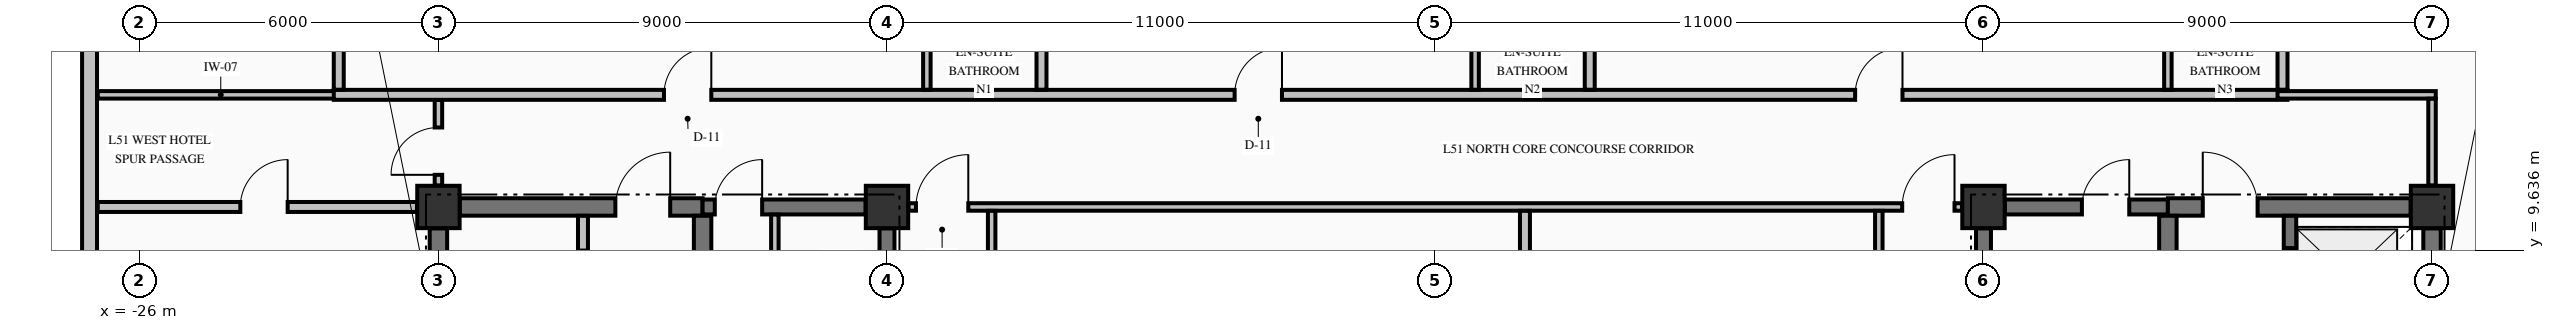
"""IFC4 building model, lengths in metres.
Left out: names, types, materials, properties, quantities, classifications, styles, units other than length and angle.
Written with IfcOpenShell. Run it as: python <this file> out.ifc"""

import sys

from ifc_helpers import new_model, si_unit, direction, frame, frame_2d, origin, origin_2d, place, context, subcontext, project, spatial, rectangle, extrude, element, fill, save


model = new_model("IFC4")
c1 = context("Model", 3, precision=1e-05, world=origin(), true_north=direction((0.0, 1.0)))
c2 = subcontext(c1, "Body", "Model", "MODEL_VIEW")
j1 = project(units=[si_unit("LENGTHUNIT", "METRE"), si_unit("PLANEANGLEUNIT", "RADIAN")], contexts=[c1])
p1 = place(None, origin())
s1 = spatial("IfcSite", under=j1, at=p1, CompositionType="ELEMENT")
p2 = place(p1, origin())
s2 = spatial("IfcBuilding", under=s1, at=p2, CompositionType="ELEMENT")
p3 = place(p2, frame((0.0, 0.0, 198.26)))
s3 = spatial("IfcBuildingStorey", under=s2, at=p3, CompositionType="ELEMENT", Elevation=198.26)
for number, where, z_axis, x_axis in (
    (1, (-20.0, 10.5, -0.25), (0.0, 0.0, 1.0), (1.0, 0.0, 0.0)),
    (2, (-11.0, 10.5, -0.25), (0.0, 0.0, 1.0), (1.0, 0.0, 0.0)),
    (3, (11.0, 10.5, -0.25), (0.0, 0.0, 1.0), (1.0, 0.0, 0.0)),
    (4, (20.0, 10.5, -0.25), (0.0, 0.0, 1.0), (1.0, 0.0, 0.0)),
):
    element("IfcColumn", number, at=place(p3, frame(where, z_axis=z_axis, x_axis=x_axis)), inside=s3, PredefinedType="COLUMN", context=c2, shape_type="SweptSolid", body=[
        extrude(rectangle(XDim=0.85, YDim=0.85, at=origin_2d()), origin(), (0.0, 0.0, 1.0), 3.4),
    ])
p4 = place(p3, frame((-27.0, 18.97, 0.0), z_axis=(0.0, 0.0, 1.0), x_axis=(0.0, -1.0, 0.0)))
e5 = element("IfcWall", 5, at=p4, inside=s3, PredefinedType="STANDARD", context=c2, shape_type="SweptSolid", body=[
    extrude(rectangle(XDim=9.44, YDim=0.3, at=frame_2d((4.72, 0.0))), origin(), (0.0, 0.0, 1.0), 2.542),
])
p5 = place(p3, frame((-19.571, 10.5, 0.0), z_axis=(0.0, 0.0, 1.0), x_axis=(1.0, 0.0, 0.0)))
e6 = element("IfcWall", 6, at=p5, inside=s3, PredefinedType="SHEAR", context=c2, shape_type="SweptSolid", body=[
    extrude(rectangle(XDim=4.871, YDim=0.35, at=frame_2d((2.436, 0.0))), origin(), (0.0, 0.0, 1.0), 3.15),
])
p6 = place(p5, frame((3.121, 0.0, 0.0)))
e7 = element("IfcOpeningElement", 7, at=p6, cuts=e6, PredefinedType="OPENING", context=c2, shape_type="SweptSolid", body=[
    extrude(rectangle(XDim=1.1, YDim=2.15, at=frame_2d((0.55, 1.075))), frame((0.0, 0.185, 0.0), z_axis=(0.0, -1.0, 0.0), x_axis=(1.0, 0.0, 0.0)), (0.0, 0.0, 1.0), 0.37),
])
p7 = place(p3, frame((-14.7, 10.5, 0.0), z_axis=(0.0, 0.0, 1.0), x_axis=(1.0, 0.0, 0.0)))
e8 = element("IfcWall", 8, at=p7, inside=s3, PredefinedType="SHEAR", context=c2, shape_type="SweptSolid", body=[
    extrude(rectangle(XDim=3.271, YDim=0.3, at=frame_2d((1.635, 0.0))), origin(), (0.0, 0.0, 1.0), 3.15),
])
p8 = place(p7, frame((0.245, 0.0, 0.0)))
e9 = element("IfcOpeningElement", 9, at=p8, cuts=e8, PredefinedType="OPENING", context=c2, shape_type="SweptSolid", body=[
    extrude(rectangle(XDim=0.95, YDim=2.15, at=frame_2d((0.475, 1.075))), frame((0.0, 0.16, 0.0), z_axis=(0.0, -1.0, 0.0), x_axis=(1.0, 0.0, 0.0)), (0.0, 0.0, 1.0), 0.32),
])
p9 = place(p3, frame((11.429, 10.5, 0.0), z_axis=(0.0, 0.0, 1.0), x_axis=(1.0, 0.0, 0.0)))
e10 = element("IfcWall", 10, at=p9, inside=s3, PredefinedType="SHEAR", context=c2, shape_type="SweptSolid", body=[
    extrude(rectangle(XDim=3.271, YDim=0.3, at=frame_2d((1.635, 0.0))), origin(), (0.0, 0.0, 1.0), 3.15),
])
p10 = place(p9, frame((1.546, 0.0, 0.0)))
e11 = element("IfcOpeningElement", 11, at=p10, cuts=e10, PredefinedType="OPENING", context=c2, shape_type="SweptSolid", body=[
    extrude(rectangle(XDim=0.95, YDim=2.15, at=frame_2d((0.475, 1.075))), frame((0.0, 0.16, 0.0), z_axis=(0.0, -1.0, 0.0), x_axis=(1.0, 0.0, 0.0)), (0.0, 0.0, 1.0), 0.32),
])
p11 = place(p3, frame((14.7, 10.5, 0.0), z_axis=(0.0, 0.0, 1.0), x_axis=(1.0, 0.0, 0.0)))
e12 = element("IfcWall", 12, at=p11, inside=s3, PredefinedType="SHEAR", context=c2, shape_type="SweptSolid", body=[
    extrude(rectangle(XDim=4.871, YDim=0.35, at=frame_2d((2.436, 0.0))), origin(), (0.0, 0.0, 1.0), 3.15),
])
p12 = place(p11, frame((0.7, 0.0, 0.0)))
e13 = element("IfcOpeningElement", 13, at=p12, cuts=e12, PredefinedType="OPENING", context=c2, shape_type="SweptSolid", body=[
    extrude(rectangle(XDim=1.1, YDim=2.15, at=frame_2d((0.55, 1.075))), frame((0.0, 0.185, 0.0), z_axis=(0.0, -1.0, 0.0), x_axis=(1.0, 0.0, 0.0)), (0.0, 0.0, 1.0), 0.37),
])
p13 = place(p3, frame((-26.835, 10.5, 0.0), z_axis=(0.0, 0.0, 1.0), x_axis=(1.0, 0.0, 0.0)))
e14 = element("IfcWall", 14, at=p13, inside=s3, PredefinedType="PARTITIONING", context=c2, shape_type="SweptSolid", body=[
    extrude(rectangle(XDim=6.404, YDim=0.2, at=frame_2d((3.202, 0.0))), origin(), (0.0, 0.0, 1.0), 3.15),
])
p14 = place(p13, frame((2.86, 0.0, 0.0)))
e15 = element("IfcOpeningElement", 15, at=p14, cuts=e14, PredefinedType="OPENING", context=c2, shape_type="SweptSolid", body=[
    extrude(rectangle(XDim=0.95, YDim=2.15, at=frame_2d((0.475, 1.075))), frame((0.0, 0.11, 0.0), z_axis=(0.0, -1.0, 0.0), x_axis=(1.0, 0.0, 0.0)), (0.0, 0.0, 1.0), 0.22),
])
p15 = place(p3, frame((-10.569, 10.5, 0.0), z_axis=(0.0, 0.0, 1.0), x_axis=(1.0, 0.0, 0.0)))
e16 = element("IfcWall", 16, at=p15, inside=s3, PredefinedType="PARTITIONING", context=c2, shape_type="SweptSolid", body=[
    extrude(rectangle(XDim=21.138, YDim=0.15, at=frame_2d((10.569, 0.0))), origin(), (0.0, 0.0, 1.0), 3.15),
])
p16 = place(p15, frame((0.15, 0.0, 0.0)))
e17 = element("IfcOpeningElement", 17, at=p16, cuts=e16, PredefinedType="OPENING", context=c2, shape_type="SweptSolid", body=[
    extrude(rectangle(XDim=1.05, YDim=2.15, at=frame_2d((0.525, 1.075))), frame((0.0, 0.085, 0.0), z_axis=(0.0, -1.0, 0.0), x_axis=(1.0, 0.0, 0.0)), (0.0, 0.0, 1.0), 0.17),
])
p17 = place(p15, frame((19.938, 0.0, 0.0)))
e18 = element("IfcOpeningElement", 18, at=p17, cuts=e16, PredefinedType="OPENING", context=c2, shape_type="SweptSolid", body=[
    extrude(rectangle(XDim=1.05, YDim=2.15, at=frame_2d((0.525, 1.075))), frame((0.0, 0.085, 0.0), z_axis=(0.0, -1.0, 0.0), x_axis=(1.0, 0.0, 0.0)), (0.0, 0.0, 1.0), 0.17),
])
p18 = place(p3, frame((-26.835, 12.75, 0.0), z_axis=(0.0, 0.0, 1.0), x_axis=(1.0, 0.0, 0.0)))
e19 = element("IfcWall", 19, at=p18, inside=s3, PredefinedType="PARTITIONING", context=c2, shape_type="SweptSolid", body=[
    extrude(rectangle(XDim=4.935, YDim=0.15, at=frame_2d((2.468, 0.0))), origin(), (0.0, 0.0, 1.0), 3.15),
])
p19 = place(p3, frame((-22.1, 12.75, 0.0), z_axis=(0.0, 0.0, 1.0), x_axis=(1.0, 0.0, 0.0)))
e20 = element("IfcWall", 20, at=p19, inside=s3, PredefinedType="PARTITIONING", context=c2, shape_type="SweptSolid", body=[
    extrude(rectangle(XDim=39.2, YDim=0.2, at=frame_2d((19.6, 0.0))), origin(), (0.0, 0.0, 1.0), 3.15),
])
p20 = place(p19, frame((6.625, 0.0, 0.0)))
e21 = element("IfcOpeningElement", 21, at=p20, cuts=e20, PredefinedType="OPENING", context=c2, shape_type="SweptSolid", body=[
    extrude(rectangle(XDim=0.95, YDim=2.15, at=frame_2d((0.475, 1.075))), frame((0.0, 0.11, 0.0), z_axis=(0.0, -1.0, 0.0), x_axis=(1.0, 0.0, 0.0)), (0.0, 0.0, 1.0), 0.22),
])
p21 = place(p19, frame((18.075, 0.0, 0.0)))
e22 = element("IfcOpeningElement", 22, at=p21, cuts=e20, PredefinedType="OPENING", context=c2, shape_type="SweptSolid", body=[
    extrude(rectangle(XDim=0.95, YDim=2.15, at=frame_2d((0.475, 1.075))), frame((0.0, 0.11, 0.0), z_axis=(0.0, -1.0, 0.0), x_axis=(1.0, 0.0, 0.0)), (0.0, 0.0, 1.0), 0.22),
])
p22 = place(p19, frame((30.525, 0.0, 0.0)))
e23 = element("IfcOpeningElement", 23, at=p22, cuts=e20, PredefinedType="OPENING", context=c2, shape_type="SweptSolid", body=[
    extrude(rectangle(XDim=0.95, YDim=2.15, at=frame_2d((0.475, 1.075))), frame((0.0, 0.11, 0.0), z_axis=(0.0, -1.0, 0.0), x_axis=(1.0, 0.0, 0.0)), (0.0, 0.0, 1.0), 0.22),
])
p23 = place(p3, frame((16.9, 12.75, 0.0), z_axis=(0.0, 0.0, 1.0), x_axis=(1.0, 0.0, 0.0)))
e24 = element("IfcWall", 24, at=p23, inside=s3, PredefinedType="PARTITIONING", context=c2, shape_type="SweptSolid", body=[
    extrude(rectangle(XDim=3.175, YDim=0.15, at=frame_2d((1.587, 0.0))), origin(), (0.0, 0.0, 1.0), 3.15),
])
p24 = place(p3, frame((-20.0, 5.327, 0.0), z_axis=(0.0, 0.0, 1.0), x_axis=(0.0, 1.0, 0.0)))
e25 = element("IfcWall", 25, at=p24, inside=s3, PredefinedType="SHEAR", context=c2, shape_type="SweptSolid", body=[
    extrude(rectangle(XDim=4.744, YDim=0.35, at=frame_2d((2.372, 0.0))), origin(), (0.0, 0.0, 1.0), 3.15),
])
p25 = place(p3, frame((-14.7, 5.852, 0.0), z_axis=(0.0, 0.0, 1.0), x_axis=(0.0, 1.0, 0.0)))
e26 = element("IfcWall", 26, at=p25, inside=s3, PredefinedType="SHEAR", context=c2, shape_type="SweptSolid", body=[
    extrude(rectangle(XDim=4.471, YDim=0.35, at=frame_2d((2.235, 0.0))), origin(), (0.0, 0.0, 1.0), 3.15),
])
for number, where, z_axis, x_axis in (
    (27, (-11.0, 5.852, 0.0), (0.0, 0.0, 1.0), (0.0, 1.0, 0.0)),
    (28, (11.0, 5.852, 0.0), (0.0, 0.0, 1.0), (0.0, 1.0, 0.0)),
):
    element("IfcWall", number, at=place(p3, frame(where, z_axis=z_axis, x_axis=x_axis)), inside=s3, PredefinedType="SHEAR", context=c2, shape_type="SweptSolid", body=[
        extrude(rectangle(XDim=4.219, YDim=0.3, at=frame_2d((2.109, 0.0))), origin(), (0.0, 0.0, 1.0), 3.15),
    ])
p26 = place(p3, frame((14.7, 5.852, 0.0), z_axis=(0.0, 0.0, 1.0), x_axis=(0.0, 1.0, 0.0)))
e29 = element("IfcWall", 29, at=p26, inside=s3, PredefinedType="SHEAR", context=c2, shape_type="SweptSolid", body=[
    extrude(rectangle(XDim=4.471, YDim=0.35, at=frame_2d((2.235, 0.0))), origin(), (0.0, 0.0, 1.0), 3.15),
])
p27 = place(p3, frame((17.15, 7.877, 0.0), z_axis=(0.0, 0.0, 1.0), x_axis=(0.0, 1.0, 0.0)))
e30 = element("IfcWall", 30, at=p27, inside=s3, PredefinedType="SOLIDWALL", context=c2, shape_type="SweptSolid", body=[
    extrude(rectangle(XDim=2.446, YDim=0.25, at=frame_2d((1.223, 0.0))), origin(), (0.0, 0.0, 1.0), 3.15),
])
p28 = place(p27, frame((0.698, 0.0, 0.0)))
e31 = element("IfcOpeningElement", 31, at=p28, cuts=e30, PredefinedType="OPENING", context=c2, shape_type="SweptSolid", body=[
    extrude(rectangle(XDim=1.1, YDim=2.2, at=frame_2d((0.55, 1.1))), frame((0.0, 0.135, 0.0), z_axis=(0.0, -1.0, 0.0), x_axis=(1.0, 0.0, 0.0)), (0.0, 0.0, 1.0), 0.27),
])
p29 = place(p3, frame((20.0, 7.877, 0.0), z_axis=(0.0, 0.0, 1.0), x_axis=(0.0, 1.0, 0.0)))
e32 = element("IfcWall", 32, at=p29, inside=s3, PredefinedType="SHEAR", context=c2, shape_type="SweptSolid", body=[
    extrude(rectangle(XDim=2.194, YDim=0.35, at=frame_2d((1.097, 0.0))), origin(), (0.0, 0.0, 1.0), 3.15),
])
p30 = place(p3, frame((-22.0, 12.853, 0.0), z_axis=(0.0, 0.0, 1.0), x_axis=(0.0, 1.0, 0.0)))
e33 = element("IfcWall", 33, at=p30, inside=s3, PredefinedType="PARTITIONING", context=c2, shape_type="SweptSolid", body=[
    extrude(rectangle(XDim=6.141, YDim=0.2, at=frame_2d((3.07, 0.0))), origin(), (0.0, 0.0, 1.0), 3.15),
])
p31 = place(p3, frame((-20.0, 10.931, 0.0), z_axis=(0.0, 0.0, 1.0), x_axis=(0.0, 1.0, 0.0)))
e34 = element("IfcWall", 34, at=p31, inside=s3, PredefinedType="PARTITIONING", context=c2, shape_type="SweptSolid", body=[
    extrude(rectangle(XDim=1.716, YDim=0.15, at=frame_2d((0.858, 0.0))), origin(), (0.0, 0.0, 1.0), 2.342),
])
p32 = place(p31, frame((0.214, 0.0, 0.0)))
e35 = element("IfcOpeningElement", 35, at=p32, cuts=e34, PredefinedType="OPENING", context=c2, shape_type="SweptSolid", body=[
    extrude(rectangle(XDim=0.95, YDim=2.15, at=frame_2d((0.475, 1.075))), frame((0.0, 0.085, 0.0), z_axis=(0.0, -1.0, 0.0), x_axis=(1.0, 0.0, 0.0)), (0.0, 0.0, 1.0), 0.17),
])
p33 = place(p3, frame((-17.1, 7.928, 0.0), z_axis=(0.0, 0.0, 1.0), x_axis=(0.0, 1.0, 0.0)))
e36 = element("IfcWall", 36, at=p33, inside=s3, PredefinedType="PARTITIONING", context=c2, shape_type="SweptSolid", body=[
    extrude(rectangle(XDim=2.394, YDim=0.2, at=frame_2d((1.197, 0.0))), origin(), (0.0, 0.0, 1.0), 3.15),
])
p34 = place(p33, frame((0.747, 0.0, 0.0)))
e37 = element("IfcOpeningElement", 37, at=p34, cuts=e36, PredefinedType="OPENING", context=c2, shape_type="SweptSolid", body=[
    extrude(rectangle(XDim=0.95, YDim=2.15, at=frame_2d((0.475, 1.075))), frame((0.0, 0.11, 0.0), z_axis=(0.0, -1.0, 0.0), x_axis=(1.0, 0.0, 0.0)), (0.0, 0.0, 1.0), 0.22),
])
p35 = place(p3, frame((-13.25, 5.853, 0.0), z_axis=(0.0, 0.0, 1.0), x_axis=(0.0, 1.0, 0.0)))
e38 = element("IfcWall", 38, at=p35, inside=s3, PredefinedType="PARTITIONING", context=c2, shape_type="SweptSolid", body=[
    extrude(rectangle(XDim=4.494, YDim=0.15, at=frame_2d((2.247, 0.0))), origin(), (0.0, 0.0, 1.0), 3.15),
])
p36 = place(p35, frame((1.472, 0.0, 0.0)))
e39 = element("IfcOpeningElement", 39, at=p36, cuts=e38, PredefinedType="OPENING", context=c2, shape_type="SweptSolid", body=[
    extrude(rectangle(XDim=0.95, YDim=2.15, at=frame_2d((0.475, 1.075))), frame((0.0, 0.085, 0.0), z_axis=(0.0, -1.0, 0.0), x_axis=(1.0, 0.0, 0.0)), (0.0, 0.0, 1.0), 0.17),
])
p37 = place(p3, frame((-10.2, 12.853, 0.0), z_axis=(0.0, 0.0, 1.0), x_axis=(0.0, 1.0, 0.0)))
e40 = element("IfcWall", 40, at=p37, inside=s3, PredefinedType="PARTITIONING", context=c2, shape_type="SweptSolid", body=[
    extrude(rectangle(XDim=2.069, YDim=0.15, at=frame_2d((1.035, 0.0))), origin(), (0.0, 0.0, 1.0), 3.15),
])
p38 = place(p3, frame((-8.9, 6.453, 0.0), z_axis=(0.0, 0.0, 1.0), x_axis=(0.0, 1.0, 0.0)))
e41 = element("IfcWall", 41, at=p38, inside=s3, PredefinedType="PARTITIONING", context=c2, shape_type="SweptSolid", body=[
    extrude(rectangle(XDim=3.969, YDim=0.15, at=frame_2d((1.985, 0.0))), origin(), (0.0, 0.0, 1.0), 3.15),
])
p39 = place(p38, frame((1.477, 0.0, 0.0)))
e42 = element("IfcOpeningElement", 42, at=p39, cuts=e41, PredefinedType="OPENING", context=c2, shape_type="SweptSolid", body=[
    extrude(rectangle(XDim=1.0, YDim=2.15, at=frame_2d((0.5, 1.075))), frame((0.0, 0.085, 0.0), z_axis=(0.0, -1.0, 0.0), x_axis=(1.0, 0.0, 0.0)), (0.0, 0.0, 1.0), 0.17),
])
p40 = place(p3, frame((-7.9, 12.853, 0.0), z_axis=(0.0, 0.0, 1.0), x_axis=(0.0, 1.0, 0.0)))
e43 = element("IfcWall", 43, at=p40, inside=s3, PredefinedType="PARTITIONING", context=c2, shape_type="SweptSolid", body=[
    extrude(rectangle(XDim=2.069, YDim=0.2, at=frame_2d((1.035, 0.0))), origin(), (0.0, 0.0, 1.0), 3.15),
])
p41 = place(p3, frame((0.8, 12.853, 0.0), z_axis=(0.0, 0.0, 1.0), x_axis=(0.0, 1.0, 0.0)))
e44 = element("IfcWall", 44, at=p41, inside=s3, PredefinedType="PARTITIONING", context=c2, shape_type="SweptSolid", body=[
    extrude(rectangle(XDim=2.069, YDim=0.15, at=frame_2d((1.035, 0.0))), origin(), (0.0, 0.0, 1.0), 3.15),
])
p42 = place(p3, frame((1.8, 6.453, 0.0), z_axis=(0.0, 0.0, 1.0), x_axis=(0.0, 1.0, 0.0)))
e45 = element("IfcWall", 45, at=p42, inside=s3, PredefinedType="PARTITIONING", context=c2, shape_type="SweptSolid", body=[
    extrude(rectangle(XDim=3.969, YDim=0.2, at=frame_2d((1.985, 0.0))), origin(), (0.0, 0.0, 1.0), 3.15),
])
p43 = place(p3, frame((3.1, 12.853, 0.0), z_axis=(0.0, 0.0, 1.0), x_axis=(0.0, 1.0, 0.0)))
e46 = element("IfcWall", 46, at=p43, inside=s3, PredefinedType="PARTITIONING", context=c2, shape_type="SweptSolid", body=[
    extrude(rectangle(XDim=2.069, YDim=0.2, at=frame_2d((1.035, 0.0))), origin(), (0.0, 0.0, 1.0), 3.15),
])
p44 = place(p3, frame((8.9, -1.497, 0.0), z_axis=(0.0, 0.0, 1.0), x_axis=(0.0, 1.0, 0.0)))
e47 = element("IfcWall", 47, at=p44, inside=s3, PredefinedType="PARTITIONING", context=c2, shape_type="SweptSolid", body=[
    extrude(rectangle(XDim=11.919, YDim=0.15, at=frame_2d((5.959, 0.0))), origin(), (0.0, 0.0, 1.0), 3.15),
])
p45 = place(p44, frame((5.397, 0.0, 0.0)))
e48 = element("IfcOpeningElement", 48, at=p45, cuts=e47, PredefinedType="OPENING", context=c2, shape_type="SweptSolid", body=[
    extrude(rectangle(XDim=1.1, YDim=2.15, at=frame_2d((0.55, 1.075))), frame((0.0, 0.085, 0.0), z_axis=(0.0, -1.0, 0.0), x_axis=(1.0, 0.0, 0.0)), (0.0, 0.0, 1.0), 0.17),
])
p46 = place(p3, frame((14.7, 12.853, 0.0), z_axis=(0.0, 0.0, 1.0), x_axis=(0.0, 1.0, 0.0)))
e49 = element("IfcWall", 49, at=p46, inside=s3, PredefinedType="PARTITIONING", context=c2, shape_type="SweptSolid", body=[
    extrude(rectangle(XDim=2.069, YDim=0.15, at=frame_2d((1.035, 0.0))), origin(), (0.0, 0.0, 1.0), 3.15),
])
p47 = place(p3, frame((17.0, 12.853, 0.0), z_axis=(0.0, 0.0, 1.0), x_axis=(0.0, 1.0, 0.0)))
e50 = element("IfcWall", 50, at=p47, inside=s3, PredefinedType="PARTITIONING", context=c2, shape_type="SweptSolid", body=[
    extrude(rectangle(XDim=2.069, YDim=0.2, at=frame_2d((1.035, 0.0))), origin(), (0.0, 0.0, 1.0), 3.15),
])
p48 = place(p3, frame((20.0, 10.931, 0.0), z_axis=(0.0, 0.0, 1.0), x_axis=(0.0, 1.0, 0.0)))
e51 = element("IfcWall", 51, at=p48, inside=s3, PredefinedType="PARTITIONING", context=c2, shape_type="SweptSolid", body=[
    extrude(rectangle(XDim=1.741, YDim=0.15, at=frame_2d((0.871, 0.0))), origin(), (0.0, 0.0, 1.0), 2.342),
])
p49 = place(p8, origin())
e52 = element("IfcDoor", 52, at=p49, inside=s3, OperationType="SINGLE_SWING_RIGHT", PredefinedType="DOOR", context=c2, shape_type="SweptSolid", body=[
    extrude(rectangle(XDim=0.95, YDim=2.15, at=frame_2d((0.475, 1.075))), frame((0.0, 0.025, 0.0), z_axis=(0.0, -1.0, 0.0), x_axis=(1.0, 0.0, 0.0)), (0.0, 0.0, 1.0), 0.05),
])
fill(e9, e52)
p50 = place(p10, origin())
e53 = element("IfcDoor", 53, at=p50, inside=s3, OperationType="SINGLE_SWING_RIGHT", PredefinedType="DOOR", context=c2, shape_type="SweptSolid", body=[
    extrude(rectangle(XDim=0.95, YDim=2.15, at=frame_2d((0.475, 1.075))), frame((0.0, 0.025, 0.0), z_axis=(0.0, -1.0, 0.0), x_axis=(1.0, 0.0, 0.0)), (0.0, 0.0, 1.0), 0.05),
])
fill(e11, e53)
p51 = place(p6, origin())
e54 = element("IfcDoor", 54, at=p51, inside=s3, OperationType="SINGLE_SWING_RIGHT", PredefinedType="DOOR", context=c2, shape_type="SweptSolid", body=[
    extrude(rectangle(XDim=1.1, YDim=2.15, at=frame_2d((0.55, 1.075))), frame((0.0, 0.025, 0.0), z_axis=(0.0, -1.0, 0.0), x_axis=(1.0, 0.0, 0.0)), (0.0, 0.0, 1.0), 0.05),
])
fill(e7, e54)
p52 = place(p28, origin())
e55 = element("IfcDoor", 55, at=p52, inside=s3, OperationType="SLIDING_TO_RIGHT", PredefinedType="DOOR", context=c2, shape_type="SweptSolid", body=[
    extrude(rectangle(XDim=1.1, YDim=2.2, at=frame_2d((0.55, 1.1))), frame((0.0, 0.025, 0.0), z_axis=(0.0, -1.0, 0.0), x_axis=(1.0, 0.0, 0.0)), (0.0, 0.0, 1.0), 0.05),
])
fill(e31, e55)
p53 = place(p12, origin())
e56 = element("IfcDoor", 56, at=p53, inside=s3, OperationType="SINGLE_SWING_LEFT", PredefinedType="DOOR", context=c2, shape_type="SweptSolid", body=[
    extrude(rectangle(XDim=1.1, YDim=2.15, at=frame_2d((0.55, 1.075))), frame((0.0, 0.025, 0.0), z_axis=(0.0, -1.0, 0.0), x_axis=(1.0, 0.0, 0.0)), (0.0, 0.0, 1.0), 0.05),
])
fill(e13, e56)
p54 = place(p16, origin())
e57 = element("IfcDoor", 57, at=p54, inside=s3, OperationType="SINGLE_SWING_RIGHT", PredefinedType="DOOR", context=c2, shape_type="SweptSolid", body=[
    extrude(rectangle(XDim=1.05, YDim=2.15, at=frame_2d((0.525, 1.075))), frame((0.0, 0.025, 0.0), z_axis=(0.0, -1.0, 0.0), x_axis=(1.0, 0.0, 0.0)), (0.0, 0.0, 1.0), 0.05),
])
fill(e17, e57)
p55 = place(p17, origin())
e58 = element("IfcDoor", 58, at=p55, inside=s3, OperationType="SINGLE_SWING_RIGHT", PredefinedType="DOOR", context=c2, shape_type="SweptSolid", body=[
    extrude(rectangle(XDim=1.05, YDim=2.15, at=frame_2d((0.525, 1.075))), frame((0.0, 0.025, 0.0), z_axis=(0.0, -1.0, 0.0), x_axis=(1.0, 0.0, 0.0)), (0.0, 0.0, 1.0), 0.05),
])
fill(e18, e58)
p56 = place(p20, origin())
e59 = element("IfcDoor", 59, at=p56, inside=s3, OperationType="SINGLE_SWING_RIGHT", PredefinedType="DOOR", context=c2, shape_type="SweptSolid", body=[
    extrude(rectangle(XDim=0.95, YDim=2.15, at=frame_2d((0.475, 1.075))), frame((0.0, 0.025, 0.0), z_axis=(0.0, -1.0, 0.0), x_axis=(1.0, 0.0, 0.0)), (0.0, 0.0, 1.0), 0.05),
])
fill(e21, e59)
p57 = place(p21, origin())
e60 = element("IfcDoor", 60, at=p57, inside=s3, OperationType="SINGLE_SWING_RIGHT", PredefinedType="DOOR", context=c2, shape_type="SweptSolid", body=[
    extrude(rectangle(XDim=0.95, YDim=2.15, at=frame_2d((0.475, 1.075))), frame((0.0, 0.025, 0.0), z_axis=(0.0, -1.0, 0.0), x_axis=(1.0, 0.0, 0.0)), (0.0, 0.0, 1.0), 0.05),
])
fill(e22, e60)
p58 = place(p22, origin())
e61 = element("IfcDoor", 61, at=p58, inside=s3, OperationType="SINGLE_SWING_RIGHT", PredefinedType="DOOR", context=c2, shape_type="SweptSolid", body=[
    extrude(rectangle(XDim=0.95, YDim=2.15, at=frame_2d((0.475, 1.075))), frame((0.0, 0.025, 0.0), z_axis=(0.0, -1.0, 0.0), x_axis=(1.0, 0.0, 0.0)), (0.0, 0.0, 1.0), 0.05),
])
fill(e23, e61)
p59 = place(p32, origin())
e62 = element("IfcDoor", 62, at=p59, inside=s3, OperationType="SINGLE_SWING_LEFT", PredefinedType="DOOR", context=c2, shape_type="SweptSolid", body=[
    extrude(rectangle(XDim=0.95, YDim=2.15, at=frame_2d((0.475, 1.075))), frame((0.0, 0.025, 0.0), z_axis=(0.0, -1.0, 0.0), x_axis=(1.0, 0.0, 0.0)), (0.0, 0.0, 1.0), 0.05),
])
fill(e35, e62)
p60 = place(p14, origin())
e63 = element("IfcDoor", 63, at=p60, inside=s3, OperationType="SINGLE_SWING_RIGHT", PredefinedType="DOOR", context=c2, shape_type="SweptSolid", body=[
    extrude(rectangle(XDim=0.95, YDim=2.15, at=frame_2d((0.475, 1.075))), frame((0.0, 0.025, 0.0), z_axis=(0.0, -1.0, 0.0), x_axis=(1.0, 0.0, 0.0)), (0.0, 0.0, 1.0), 0.05),
])
fill(e15, e63)
save(model, sys.argv[1])
